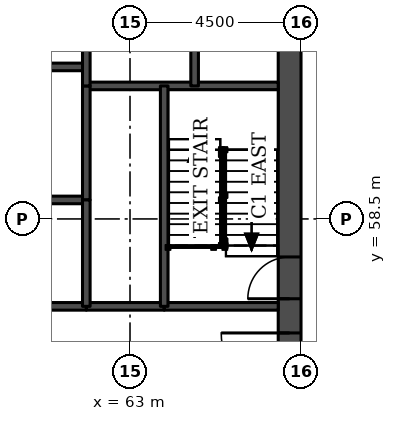
"""IFC4 building model, lengths in metres.
Left out: names, types, materials, properties, quantities, classifications, styles, units other than length and angle.
Written with IfcOpenShell. Run it as: python <this file> out.ifc"""

import sys

from ifc_helpers import new_model, si_unit, direction, frame, frame_2d, origin, place, context, subcontext, project, spatial, rectangle, extrude, element, fill, save


model = new_model("IFC4")
c1 = context("Model", 3, precision=1e-05, world=origin(), true_north=direction((0.0, 1.0)))
c2 = subcontext(c1, "Body", "Model", "MODEL_VIEW")
j1 = project(units=[si_unit("LENGTHUNIT", "METRE"), si_unit("PLANEANGLEUNIT", "RADIAN")], contexts=[c1])
p1 = place(None, origin())
s1 = spatial("IfcSite", under=j1, at=p1, CompositionType="ELEMENT")
p2 = place(p1, origin())
s2 = spatial("IfcBuilding", under=s1, at=p2, CompositionType="ELEMENT")
p3 = place(p2, frame((0.0, 0.0, 8.0)))
s3 = spatial("IfcBuildingStorey", under=s2, at=p3, CompositionType="ELEMENT", Elevation=8.0)
p4 = place(p3, frame((67.2, 49.5, 0.0), z_axis=(0.0, 0.0, 1.0), x_axis=(0.0, 1.0, 0.0)))
e1 = element("IfcWall", 1, at=p4, inside=s3, PredefinedType="SHEAR", context=c2, shape_type="SweptSolid", body=[
    extrude(rectangle(XDim=22.5, YDim=0.6, at=frame_2d((11.25, 0.0))), origin(), (0.0, 0.0, 1.0), 5.5),
])
p5 = place(p4, frame((4.2, 0.0, 0.0)))
e2 = element("IfcOpeningElement", 2, at=p5, cuts=e1, PredefinedType="OPENING", context=c2, shape_type="SweptSolid", body=[
    extrude(rectangle(XDim=1.8, YDim=2.1, at=frame_2d((0.9, 1.05))), frame((0.0, 0.31, 0.0), z_axis=(0.0, -1.0, 0.0), x_axis=(1.0, 0.0, 0.0)), (0.0, 0.0, 1.0), 0.62),
])
p6 = place(p4, frame((6.9, 0.0, 0.0)))
e3 = element("IfcOpeningElement", 3, at=p6, cuts=e1, PredefinedType="OPENING", context=c2, shape_type="SweptSolid", body=[
    extrude(rectangle(XDim=1.1, YDim=2.1, at=frame_2d((0.55, 1.05))), frame((0.0, 0.31, 0.0), z_axis=(0.0, -1.0, 0.0), x_axis=(1.0, 0.0, 0.0)), (0.0, 0.0, 1.0), 0.62),
])
p7 = place(p4, frame((13.6, 0.0, 0.0)))
e4 = element("IfcOpeningElement", 4, at=p7, cuts=e1, PredefinedType="OPENING", context=c2, shape_type="SweptSolid", body=[
    extrude(rectangle(XDim=1.1, YDim=2.1, at=frame_2d((0.55, 1.05))), frame((0.0, 0.31, 0.0), z_axis=(0.0, -1.0, 0.0), x_axis=(1.0, 0.0, 0.0)), (0.0, 0.0, 1.0), 0.62),
])
p8 = place(p4, frame((16.5, 0.0, 0.0)))
e5 = element("IfcOpeningElement", 5, at=p8, cuts=e1, PredefinedType="OPENING", context=c2, shape_type="SweptSolid", body=[
    extrude(rectangle(XDim=1.8, YDim=2.1, at=frame_2d((0.9, 1.05))), frame((0.0, 0.31, 0.0), z_axis=(0.0, -1.0, 0.0), x_axis=(1.0, 0.0, 0.0)), (0.0, 0.0, 1.0), 0.62),
])
p9 = place(p3, frame((61.85, 56.2, 0.0), z_axis=(0.0, 0.0, 1.0), x_axis=(1.0, 0.0, 0.0)))
e6 = element("IfcWall", 6, at=p9, inside=s3, PredefinedType="SOLIDWALL", context=c2, shape_type="SweptSolid", body=[
    extrude(rectangle(XDim=2.05, YDim=0.2, at=frame_2d((1.025, 0.0))), origin(), (0.0, 0.0, 1.0), 5.15),
])
p10 = place(p3, frame((50.65, 56.2, 0.0), z_axis=(0.0, 0.0, 1.0), x_axis=(1.0, 0.0, 0.0)))
e7 = element("IfcWall", 7, at=p10, inside=s3, PredefinedType="SOLIDWALL", context=c2, shape_type="SweptSolid", body=[
    extrude(rectangle(XDim=11.2, YDim=0.2, at=frame_2d((5.6, 0.0))), origin(), (0.0, 0.0, 1.0), 5.15),
])
p11 = place(p3, frame((63.9, 56.2, 0.0), z_axis=(0.0, 0.0, 1.0), x_axis=(1.0, 0.0, 0.0)))
e8 = element("IfcWall", 8, at=p11, inside=s3, PredefinedType="SOLIDWALL", context=c2, shape_type="SweptSolid", body=[
    extrude(rectangle(XDim=3.0, YDim=0.2, at=frame_2d((1.5, 0.0))), origin(), (0.0, 0.0, 1.0), 5.15),
])
p12 = place(p3, frame((50.65, 59.0, 0.0), z_axis=(0.0, 0.0, 1.0), x_axis=(1.0, 0.0, 0.0)))
e9 = element("IfcWall", 9, at=p12, inside=s3, PredefinedType="SOLIDWALL", context=c2, shape_type="SweptSolid", body=[
    extrude(rectangle(XDim=11.2, YDim=0.2, at=frame_2d((5.6, 0.0))), origin(), (0.0, 0.0, 1.0), 5.5),
])
p13 = place(p3, frame((61.85, 62.0, 0.0), z_axis=(0.0, 0.0, 1.0), x_axis=(1.0, 0.0, 0.0)))
e10 = element("IfcWall", 10, at=p13, inside=s3, PredefinedType="SOLIDWALL", context=c2, shape_type="SweptSolid", body=[
    extrude(rectangle(XDim=5.05, YDim=0.2, at=frame_2d((2.525, 0.0))), origin(), (0.0, 0.0, 1.0), 5.15),
])
p14 = place(p3, frame((50.65, 62.5, 0.0), z_axis=(0.0, 0.0, 1.0), x_axis=(1.0, 0.0, 0.0)))
e11 = element("IfcWall", 11, at=p14, inside=s3, PredefinedType="SOLIDWALL", context=c2, shape_type="SweptSolid", body=[
    extrude(rectangle(XDim=11.2, YDim=0.2, at=frame_2d((5.6, 0.0))), origin(), (0.0, 0.0, 1.0), 5.5),
])
p15 = place(p3, frame((61.85, 59.0, 0.0), z_axis=(0.0, 0.0, 1.0), x_axis=(0.0, 1.0, 0.0)))
e12 = element("IfcWall", 12, at=p15, inside=s3, PredefinedType="SOLIDWALL", context=c2, shape_type="SweptSolid", body=[
    extrude(rectangle(XDim=3.0, YDim=0.2, at=frame_2d((1.5, 0.0))), origin(), (0.0, 0.0, 1.0), 5.5),
])
p16 = place(p3, frame((61.85, 56.2, 0.0), z_axis=(0.0, 0.0, 1.0), x_axis=(0.0, 1.0, 0.0)))
e13 = element("IfcWall", 13, at=p16, inside=s3, PredefinedType="SOLIDWALL", context=c2, shape_type="SweptSolid", body=[
    extrude(rectangle(XDim=2.8, YDim=0.2, at=frame_2d((1.4, 0.0))), origin(), (0.0, 0.0, 1.0), 5.15),
])
p17 = place(p3, frame((61.85, 62.0, 0.0), z_axis=(0.0, 0.0, 1.0), x_axis=(0.0, 1.0, 0.0)))
e14 = element("IfcWall", 14, at=p17, inside=s3, PredefinedType="SOLIDWALL", context=c2, shape_type="SweptSolid", body=[
    extrude(rectangle(XDim=3.3, YDim=0.2, at=frame_2d((1.65, 0.0))), origin(), (0.0, 0.0, 1.0), 5.15),
])
p18 = place(p3, frame((63.9, 56.2, 0.0), z_axis=(0.0, 0.0, 1.0), x_axis=(0.0, 1.0, 0.0)))
e15 = element("IfcWall", 15, at=p18, inside=s3, PredefinedType="SOLIDWALL", context=c2, shape_type="SweptSolid", body=[
    extrude(rectangle(XDim=5.8, YDim=0.2, at=frame_2d((2.9, 0.0))), origin(), (0.0, 0.0, 1.0), 5.15),
])
p19 = place(p3, frame((64.7, 62.0, 0.0), z_axis=(0.0, 0.0, 1.0), x_axis=(0.0, 1.0, 0.0)))
e16 = element("IfcWall", 16, at=p19, inside=s3, PredefinedType="SOLIDWALL", context=c2, shape_type="SweptSolid", body=[
    extrude(rectangle(XDim=3.3, YDim=0.2, at=frame_2d((1.65, 0.0))), origin(), (0.0, 0.0, 1.0), 5.15),
])
p20 = place(p19, frame((1.1, 0.0, 0.0)))
e17 = element("IfcOpeningElement", 17, at=p20, cuts=e16, PredefinedType="OPENING", context=c2, shape_type="SweptSolid", body=[
    extrude(rectangle(XDim=1.1, YDim=2.1, at=frame_2d((0.55, 1.05))), frame((0.0, 0.11, 0.0), z_axis=(0.0, -1.0, 0.0), x_axis=(1.0, 0.0, 0.0)), (0.0, 0.0, 1.0), 0.22),
])
p21 = place(p5, origin())
e18 = element("IfcDoor", 18, at=p21, inside=s3, OperationType="SINGLE_SWING_RIGHT", PredefinedType="DOOR", context=c2, shape_type="SweptSolid", body=[
    extrude(rectangle(XDim=1.8, YDim=2.1, at=frame_2d((0.9, 1.05))), frame((0.0, 0.025, 0.0), z_axis=(0.0, -1.0, 0.0), x_axis=(1.0, 0.0, 0.0)), (0.0, 0.0, 1.0), 0.05),
])
fill(e2, e18)
p22 = place(p6, origin())
e19 = element("IfcDoor", 19, at=p22, inside=s3, OperationType="SINGLE_SWING_LEFT", PredefinedType="DOOR", context=c2, shape_type="SweptSolid", body=[
    extrude(rectangle(XDim=1.1, YDim=2.1, at=frame_2d((0.55, 1.05))), frame((0.0, 0.025, 0.0), z_axis=(0.0, -1.0, 0.0), x_axis=(1.0, 0.0, 0.0)), (0.0, 0.0, 1.0), 0.05),
])
fill(e3, e19)
save(model, sys.argv[1])
